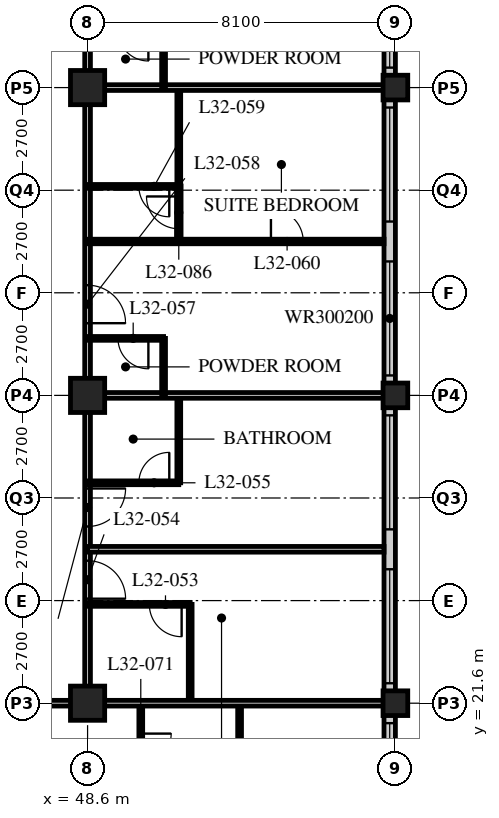
"""IFC4 building model, lengths in metres.
Left out: names, types, materials, properties, quantities, classifications, styles, units other than length and angle.
Written with IfcOpenShell. Run it as: python <this file> out.ifc"""

import sys

from ifc_helpers import new_model, si_unit, direction, frame, frame_2d, origin, origin_2d, place, context, subcontext, project, spatial, rectangle, hollow_rectangle, extrude, element, fill, save


model = new_model("IFC4")
c1 = context("Model", 3, precision=1e-05, world=origin(), true_north=direction((0.0, 1.0)))
c2 = subcontext(c1, "Body", "Model", "MODEL_VIEW")
j1 = project(units=[si_unit("LENGTHUNIT", "METRE"), si_unit("PLANEANGLEUNIT", "RADIAN")], contexts=[c1])
p1 = place(None, origin())
s1 = spatial("IfcSite", under=j1, at=p1, CompositionType="ELEMENT")
p2 = place(p1, origin())
s2 = spatial("IfcBuilding", under=s1, at=p2, CompositionType="ELEMENT")
p3 = place(p2, frame((0.0, 0.0, 127.2)))
s3 = spatial("IfcBuildingStorey", under=s2, at=p3, CompositionType="ELEMENT", Elevation=127.2)
for number, where, z_axis, x_axis in (
    (1, (48.6, 21.6, 0.0), (0.0, 0.0, 1.0), (1.0, 0.0, 0.0)),
    (2, (48.6, 29.7, 0.0), (0.0, 0.0, 1.0), (1.0, 0.0, 0.0)),
    (3, (48.6, 37.8, 0.0), (0.0, 0.0, 1.0), (1.0, 0.0, 0.0)),
):
    element("IfcColumn", number, at=place(p3, frame(where, z_axis=z_axis, x_axis=x_axis)), inside=s3, PredefinedType="COLUMN", context=c2, shape_type="SweptSolid", body=[
        extrude(hollow_rectangle(XDim=0.9, YDim=0.9, WallThickness=0.09, at=origin_2d()), origin(), (0.0, 0.0, 1.0), 3.4),
    ])
for number, where, z_axis, x_axis in (
    (4, (56.7, 21.6, 0.0), (0.0, 0.0, 1.0), (1.0, 0.0, 0.0)),
    (5, (56.7, 29.7, 0.0), (0.0, 0.0, 1.0), (1.0, 0.0, 0.0)),
    (6, (56.7, 37.8, 0.0), (0.0, 0.0, 1.0), (1.0, 0.0, 0.0)),
):
    element("IfcColumn", number, at=place(p3, frame(where, z_axis=z_axis, x_axis=x_axis)), inside=s3, PredefinedType="COLUMN", context=c2, shape_type="SweptSolid", body=[
        extrude(hollow_rectangle(XDim=0.65, YDim=0.65, WallThickness=0.055, at=origin_2d()), origin(), (0.0, 0.0, 1.0), 3.4),
    ])
p4 = place(p3, frame((56.55, 13.8, 0.0), z_axis=(0.0, 0.0, 1.0), x_axis=(0.0, 1.0, 0.0)))
e7 = element("IfcWall", 7, at=p4, inside=s3, PredefinedType="SOLIDWALL", context=c2, shape_type="SweptSolid", body=[
    extrude(rectangle(XDim=32.1, YDim=0.3, at=frame_2d((16.05, 0.0))), origin(), (0.0, 0.0, 1.0), 3.19),
])
p5 = place(p4, frame((0.225, 0.0, 0.9)))
e8 = element("IfcOpeningElement", 8, at=p5, cuts=e7, PredefinedType="OPENING", context=c2, shape_type="SweptSolid", body=[
    extrude(rectangle(XDim=3.0, YDim=2.0, at=frame_2d((1.5, 1.0))), frame((0.0, 0.16, 0.0), z_axis=(0.0, -1.0, 0.0), x_axis=(1.0, 0.0, 0.0)), (0.0, 0.0, 1.0), 0.32),
])
p6 = place(p4, frame((4.275, 0.0, 0.9)))
e9 = element("IfcOpeningElement", 9, at=p6, cuts=e7, PredefinedType="OPENING", context=c2, shape_type="SweptSolid", body=[
    extrude(rectangle(XDim=3.0, YDim=2.0, at=frame_2d((1.5, 1.0))), frame((0.0, 0.16, 0.0), z_axis=(0.0, -1.0, 0.0), x_axis=(1.0, 0.0, 0.0)), (0.0, 0.0, 1.0), 0.32),
])
p7 = place(p4, frame((8.325, 0.0, 0.9)))
e10 = element("IfcOpeningElement", 10, at=p7, cuts=e7, PredefinedType="OPENING", context=c2, shape_type="SweptSolid", body=[
    extrude(rectangle(XDim=3.0, YDim=2.0, at=frame_2d((1.5, 1.0))), frame((0.0, 0.16, 0.0), z_axis=(0.0, -1.0, 0.0), x_axis=(1.0, 0.0, 0.0)), (0.0, 0.0, 1.0), 0.32),
])
p8 = place(p4, frame((12.375, 0.0, 0.9)))
e11 = element("IfcOpeningElement", 11, at=p8, cuts=e7, PredefinedType="OPENING", context=c2, shape_type="SweptSolid", body=[
    extrude(rectangle(XDim=3.0, YDim=2.0, at=frame_2d((1.5, 1.0))), frame((0.0, 0.16, 0.0), z_axis=(0.0, -1.0, 0.0), x_axis=(1.0, 0.0, 0.0)), (0.0, 0.0, 1.0), 0.32),
])
p9 = place(p4, frame((16.425, 0.0, 0.9)))
e12 = element("IfcOpeningElement", 12, at=p9, cuts=e7, PredefinedType="OPENING", context=c2, shape_type="SweptSolid", body=[
    extrude(rectangle(XDim=3.0, YDim=2.0, at=frame_2d((1.5, 1.0))), frame((0.0, 0.16, 0.0), z_axis=(0.0, -1.0, 0.0), x_axis=(1.0, 0.0, 0.0)), (0.0, 0.0, 1.0), 0.32),
])
p10 = place(p4, frame((20.475, 0.0, 0.9)))
e13 = element("IfcOpeningElement", 13, at=p10, cuts=e7, PredefinedType="OPENING", context=c2, shape_type="SweptSolid", body=[
    extrude(rectangle(XDim=3.0, YDim=2.0, at=frame_2d((1.5, 1.0))), frame((0.0, 0.16, 0.0), z_axis=(0.0, -1.0, 0.0), x_axis=(1.0, 0.0, 0.0)), (0.0, 0.0, 1.0), 0.32),
])
p11 = place(p4, frame((24.525, 0.0, 0.9)))
e14 = element("IfcOpeningElement", 14, at=p11, cuts=e7, PredefinedType="OPENING", context=c2, shape_type="SweptSolid", body=[
    extrude(rectangle(XDim=3.0, YDim=2.0, at=frame_2d((1.5, 1.0))), frame((0.0, 0.16, 0.0), z_axis=(0.0, -1.0, 0.0), x_axis=(1.0, 0.0, 0.0)), (0.0, 0.0, 1.0), 0.32),
])
p12 = place(p4, frame((28.575, 0.0, 0.9)))
e15 = element("IfcOpeningElement", 15, at=p12, cuts=e7, PredefinedType="OPENING", context=c2, shape_type="SweptSolid", body=[
    extrude(rectangle(XDim=3.0, YDim=2.0, at=frame_2d((1.5, 1.0))), frame((0.0, 0.16, 0.0), z_axis=(0.0, -1.0, 0.0), x_axis=(1.0, 0.0, 0.0)), (0.0, 0.0, 1.0), 0.32),
])
p13 = place(p3, frame((8.1, 21.6, 0.0), z_axis=(0.0, 0.0, 1.0), x_axis=(1.0, 0.0, 0.0)))
e16 = element("IfcWall", 16, at=p13, inside=s3, PredefinedType="PARTITIONING", context=c2, shape_type="SweptSolid", body=[
    extrude(rectangle(XDim=40.5, YDim=0.15, at=frame_2d((20.25, 0.0))), origin(), (0.0, 0.0, 1.0), 2.578),
])
p14 = place(p13, frame((9.625, 0.0, 0.0)))
e17 = element("IfcOpeningElement", 17, at=p14, cuts=e16, PredefinedType="OPENING", context=c2, shape_type="SweptSolid", body=[
    extrude(rectangle(XDim=1.0, YDim=2.1, at=frame_2d((0.5, 1.05))), frame((0.0, 0.085, 0.0), z_axis=(0.0, -1.0, 0.0), x_axis=(1.0, 0.0, 0.0)), (0.0, 0.0, 1.0), 0.17),
])
p15 = place(p13, frame((21.775, 0.0, 0.0)))
e18 = element("IfcOpeningElement", 18, at=p15, cuts=e16, PredefinedType="OPENING", context=c2, shape_type="SweptSolid", body=[
    extrude(rectangle(XDim=1.0, YDim=2.1, at=frame_2d((0.5, 1.05))), frame((0.0, 0.085, 0.0), z_axis=(0.0, -1.0, 0.0), x_axis=(1.0, 0.0, 0.0)), (0.0, 0.0, 1.0), 0.17),
])
p16 = place(p13, frame((28.95, 0.0, 0.0)))
e19 = element("IfcOpeningElement", 19, at=p16, cuts=e16, PredefinedType="OPENING", context=c2, shape_type="SweptSolid", body=[
    extrude(rectangle(XDim=1.0, YDim=2.1, at=frame_2d((0.5, 1.05))), frame((0.0, 0.085, 0.0), z_axis=(0.0, -1.0, 0.0), x_axis=(1.0, 0.0, 0.0)), (0.0, 0.0, 1.0), 0.17),
])
p17 = place(p13, frame((34.85, 0.0, 0.0)))
e20 = element("IfcOpeningElement", 20, at=p17, cuts=e16, PredefinedType="OPENING", context=c2, shape_type="SweptSolid", body=[
    extrude(rectangle(XDim=1.0, YDim=2.1, at=frame_2d((0.5, 1.05))), frame((0.0, 0.085, 0.0), z_axis=(0.0, -1.0, 0.0), x_axis=(1.0, 0.0, 0.0)), (0.0, 0.0, 1.0), 0.17),
])
p18 = place(p13, frame((1.525, 0.0, 0.0)))
e21 = element("IfcOpeningElement", 21, at=p18, cuts=e16, PredefinedType="OPENING", context=c2, shape_type="SweptSolid", body=[
    extrude(rectangle(XDim=1.0, YDim=2.1, at=frame_2d((0.5, 1.05))), frame((0.0, 0.085, 0.0), z_axis=(0.0, -1.0, 0.0), x_axis=(1.0, 0.0, 0.0)), (0.0, 0.0, 1.0), 0.17),
])
p19 = place(p13, frame((37.975, 0.0, 0.0)))
e22 = element("IfcOpeningElement", 22, at=p19, cuts=e16, PredefinedType="OPENING", context=c2, shape_type="SweptSolid", body=[
    extrude(rectangle(XDim=1.0, YDim=2.1, at=frame_2d((0.5, 1.05))), frame((0.0, 0.085, 0.0), z_axis=(0.0, -1.0, 0.0), x_axis=(1.0, 0.0, 0.0)), (0.0, 0.0, 1.0), 0.17),
])
p20 = place(p3, frame((48.6, 21.6, 0.0), z_axis=(0.0, 0.0, 1.0), x_axis=(0.0, 1.0, 0.0)))
e23 = element("IfcWall", 23, at=p20, inside=s3, PredefinedType="PARTITIONING", context=c2, shape_type="SweptSolid", body=[
    extrude(rectangle(XDim=24.3, YDim=0.15, at=frame_2d((12.15, 0.0))), origin(), (0.0, 0.0, 1.0), 2.578),
])
p21 = place(p20, frame((2.75, 0.0, 0.0)))
e24 = element("IfcOpeningElement", 24, at=p21, cuts=e23, PredefinedType="OPENING", context=c2, shape_type="SweptSolid", body=[
    extrude(rectangle(XDim=1.0, YDim=2.1, at=frame_2d((0.5, 1.05))), frame((0.0, 0.085, 0.0), z_axis=(0.0, -1.0, 0.0), x_axis=(1.0, 0.0, 0.0)), (0.0, 0.0, 1.0), 0.17),
])
p22 = place(p20, frame((4.65, 0.0, 0.0)))
e25 = element("IfcOpeningElement", 25, at=p22, cuts=e23, PredefinedType="OPENING", context=c2, shape_type="SweptSolid", body=[
    extrude(rectangle(XDim=1.0, YDim=2.1, at=frame_2d((0.5, 1.05))), frame((0.0, 0.085, 0.0), z_axis=(0.0, -1.0, 0.0), x_axis=(1.0, 0.0, 0.0)), (0.0, 0.0, 1.0), 0.17),
])
p23 = place(p20, frame((10.0, 0.0, 0.0)))
e26 = element("IfcOpeningElement", 26, at=p23, cuts=e23, PredefinedType="OPENING", context=c2, shape_type="SweptSolid", body=[
    extrude(rectangle(XDim=1.0, YDim=2.1, at=frame_2d((0.5, 1.05))), frame((0.0, 0.085, 0.0), z_axis=(0.0, -1.0, 0.0), x_axis=(1.0, 0.0, 0.0)), (0.0, 0.0, 1.0), 0.17),
])
p24 = place(p20, frame((18.1, 0.0, 0.0)))
e27 = element("IfcOpeningElement", 27, at=p24, cuts=e23, PredefinedType="OPENING", context=c2, shape_type="SweptSolid", body=[
    extrude(rectangle(XDim=1.0, YDim=2.1, at=frame_2d((0.5, 1.05))), frame((0.0, 0.085, 0.0), z_axis=(0.0, -1.0, 0.0), x_axis=(1.0, 0.0, 0.0)), (0.0, 0.0, 1.0), 0.17),
])
p25 = place(p3, frame((51.3, 21.6, 0.0), z_axis=(0.0, 0.0, 1.0), x_axis=(0.0, 1.0, 0.0)))
e28 = element("IfcWall", 28, at=p25, inside=s3, PredefinedType="PARTITIONING", context=c2, shape_type="SweptSolid", body=[
    extrude(rectangle(XDim=2.6, YDim=0.1, at=frame_2d((1.3, 0.0))), origin(), (0.0, 0.0, 1.0), 3.19),
])
p26 = place(p3, frame((48.6, 24.2, 0.0), z_axis=(0.0, 0.0, 1.0), x_axis=(1.0, 0.0, 0.0)))
e29 = element("IfcWall", 29, at=p26, inside=s3, PredefinedType="PARTITIONING", context=c2, shape_type="SweptSolid", body=[
    extrude(rectangle(XDim=2.7, YDim=0.1, at=frame_2d((1.35, 0.0))), origin(), (0.0, 0.0, 1.0), 3.19),
])
p27 = place(p26, frame((1.625, 0.0, 0.0)))
e30 = element("IfcOpeningElement", 30, at=p27, cuts=e29, PredefinedType="OPENING", context=c2, shape_type="SweptSolid", body=[
    extrude(rectangle(XDim=0.85, YDim=2.1, at=frame_2d((0.425, 1.05))), frame((0.0, 0.06, 0.0), z_axis=(0.0, -1.0, 0.0), x_axis=(1.0, 0.0, 0.0)), (0.0, 0.0, 1.0), 0.12),
])
p28 = place(p3, frame((48.6, 25.65, 0.0), z_axis=(0.0, 0.0, 1.0), x_axis=(1.0, 0.0, 0.0)))
e31 = element("IfcWall", 31, at=p28, inside=s3, PredefinedType="PARTITIONING", context=c2, shape_type="SweptSolid", body=[
    extrude(rectangle(XDim=7.8, YDim=0.15, at=frame_2d((3.9, 0.0))), origin(), (0.0, 0.0, 1.0), 3.19),
])
p29 = place(p3, frame((51.0, 27.4, 0.0), z_axis=(0.0, 0.0, 1.0), x_axis=(0.0, 1.0, 0.0)))
e32 = element("IfcWall", 32, at=p29, inside=s3, PredefinedType="PARTITIONING", context=c2, shape_type="SweptSolid", body=[
    extrude(rectangle(XDim=2.3, YDim=0.1, at=frame_2d((1.15, 0.0))), origin(), (0.0, 0.0, 1.0), 3.19),
])
p30 = place(p3, frame((48.6, 27.4, 0.0), z_axis=(0.0, 0.0, 1.0), x_axis=(1.0, 0.0, 0.0)))
e33 = element("IfcWall", 33, at=p30, inside=s3, PredefinedType="PARTITIONING", context=c2, shape_type="SweptSolid", body=[
    extrude(rectangle(XDim=2.4, YDim=0.1, at=frame_2d((1.2, 0.0))), origin(), (0.0, 0.0, 1.0), 3.19),
])
p31 = place(p30, frame((1.35, 0.0, 0.0)))
e34 = element("IfcOpeningElement", 34, at=p31, cuts=e33, PredefinedType="OPENING", context=c2, shape_type="SweptSolid", body=[
    extrude(rectangle(XDim=0.8, YDim=2.1, at=frame_2d((0.4, 1.05))), frame((0.0, 0.06, 0.0), z_axis=(0.0, -1.0, 0.0), x_axis=(1.0, 0.0, 0.0)), (0.0, 0.0, 1.0), 0.12),
])
p32 = place(p3, frame((48.6, 29.7, 0.0), z_axis=(0.0, 0.0, 1.0), x_axis=(1.0, 0.0, 0.0)))
e35 = element("IfcWall", 35, at=p32, inside=s3, PredefinedType="PARTITIONING", context=c2, shape_type="SweptSolid", body=[
    extrude(rectangle(XDim=7.8, YDim=0.15, at=frame_2d((3.9, 0.0))), origin(), (0.0, 0.0, 1.0), 2.578),
])
p33 = place(p3, frame((50.6, 29.7, 0.0), z_axis=(0.0, 0.0, 1.0), x_axis=(0.0, 1.0, 0.0)))
e36 = element("IfcWall", 36, at=p33, inside=s3, PredefinedType="PARTITIONING", context=c2, shape_type="SweptSolid", body=[
    extrude(rectangle(XDim=1.5, YDim=0.1, at=frame_2d((0.75, 0.0))), origin(), (0.0, 0.0, 1.0), 3.19),
])
p34 = place(p3, frame((48.6, 31.2, 0.0), z_axis=(0.0, 0.0, 1.0), x_axis=(1.0, 0.0, 0.0)))
e37 = element("IfcWall", 37, at=p34, inside=s3, PredefinedType="PARTITIONING", context=c2, shape_type="SweptSolid", body=[
    extrude(rectangle(XDim=2.0, YDim=0.1, at=frame_2d((1.0, 0.0))), origin(), (0.0, 0.0, 1.0), 3.19),
])
p35 = place(p34, frame((0.8, 0.0, 0.0)))
e38 = element("IfcOpeningElement", 38, at=p35, cuts=e37, PredefinedType="OPENING", context=c2, shape_type="SweptSolid", body=[
    extrude(rectangle(XDim=0.8, YDim=2.1, at=frame_2d((0.4, 1.05))), frame((0.0, 0.06, 0.0), z_axis=(0.0, -1.0, 0.0), x_axis=(1.0, 0.0, 0.0)), (0.0, 0.0, 1.0), 0.12),
])
p36 = place(p3, frame((51.0, 35.2, 0.0), z_axis=(0.0, 0.0, 1.0), x_axis=(0.0, 1.0, 0.0)))
e39 = element("IfcWall", 39, at=p36, inside=s3, PredefinedType="PARTITIONING", context=c2, shape_type="SweptSolid", body=[
    extrude(rectangle(XDim=2.6, YDim=0.1, at=frame_2d((1.3, 0.0))), origin(), (0.0, 0.0, 1.0), 3.19),
])
p37 = place(p3, frame((48.6, 35.2, 0.0), z_axis=(0.0, 0.0, 1.0), x_axis=(1.0, 0.0, 0.0)))
e40 = element("IfcWall", 40, at=p37, inside=s3, PredefinedType="PARTITIONING", context=c2, shape_type="SweptSolid", body=[
    extrude(rectangle(XDim=2.4, YDim=0.1, at=frame_2d((1.2, 0.0))), origin(), (0.0, 0.0, 1.0), 3.19),
])
p38 = place(p37, frame((1.35, 0.0, 0.0)))
e41 = element("IfcOpeningElement", 41, at=p38, cuts=e40, PredefinedType="OPENING", context=c2, shape_type="SweptSolid", body=[
    extrude(rectangle(XDim=0.8, YDim=2.1, at=frame_2d((0.4, 1.05))), frame((0.0, 0.06, 0.0), z_axis=(0.0, -1.0, 0.0), x_axis=(1.0, 0.0, 0.0)), (0.0, 0.0, 1.0), 0.12),
])
p39 = place(p3, frame((48.6, 33.75, 0.0), z_axis=(0.0, 0.0, 1.0), x_axis=(1.0, 0.0, 0.0)))
e42 = element("IfcWall", 42, at=p39, inside=s3, PredefinedType="PARTITIONING", context=c2, shape_type="SweptSolid", body=[
    extrude(rectangle(XDim=7.8, YDim=0.12, at=frame_2d((3.9, 0.0))), origin(), (0.0, 0.0, 1.0), 3.19),
])
p40 = place(p39, frame((4.825, 0.0, 0.0)))
e43 = element("IfcOpeningElement", 43, at=p40, cuts=e42, PredefinedType="OPENING", context=c2, shape_type="SweptSolid", body=[
    extrude(rectangle(XDim=0.85, YDim=2.1, at=frame_2d((0.425, 1.05))), frame((0.0, 0.07, 0.0), z_axis=(0.0, -1.0, 0.0), x_axis=(1.0, 0.0, 0.0)), (0.0, 0.0, 1.0), 0.14),
])
p41 = place(p3, frame((48.6, 37.8, 0.0), z_axis=(0.0, 0.0, 1.0), x_axis=(1.0, 0.0, 0.0)))
e44 = element("IfcWall", 44, at=p41, inside=s3, PredefinedType="PARTITIONING", context=c2, shape_type="SweptSolid", body=[
    extrude(rectangle(XDim=7.8, YDim=0.15, at=frame_2d((3.9, 0.0))), origin(), (0.0, 0.0, 1.0), 2.578),
])
p42 = place(p3, frame((50.6, 37.8, 0.0), z_axis=(0.0, 0.0, 1.0), x_axis=(0.0, 1.0, 0.0)))
e45 = element("IfcWall", 45, at=p42, inside=s3, PredefinedType="PARTITIONING", context=c2, shape_type="SweptSolid", body=[
    extrude(rectangle(XDim=1.5, YDim=0.1, at=frame_2d((0.75, 0.0))), origin(), (0.0, 0.0, 1.0), 3.19),
])
p43 = place(p3, frame((50.0, 21.6, 0.0), z_axis=(0.0, 0.0, 1.0), x_axis=(0.0, -1.0, 0.0)))
e46 = element("IfcWall", 46, at=p43, inside=s3, PredefinedType="PARTITIONING", context=c2, shape_type="SweptSolid", body=[
    extrude(rectangle(XDim=2.4, YDim=0.1, at=frame_2d((1.2, 0.0))), origin(), (0.0, 0.0, 1.0), 3.19),
])
p44 = place(p43, frame((0.8, 0.0, 0.0)))
e47 = element("IfcOpeningElement", 47, at=p44, cuts=e46, PredefinedType="OPENING", context=c2, shape_type="SweptSolid", body=[
    extrude(rectangle(XDim=0.8, YDim=2.1, at=frame_2d((0.4, 1.05))), frame((0.0, 0.06, 0.0), z_axis=(0.0, -1.0, 0.0), x_axis=(1.0, 0.0, 0.0)), (0.0, 0.0, 1.0), 0.12),
])
p45 = place(p3, frame((52.6, 21.6, 0.0), z_axis=(0.0, 0.0, 1.0), x_axis=(0.0, -1.0, 0.0)))
e48 = element("IfcWall", 48, at=p45, inside=s3, PredefinedType="PARTITIONING", context=c2, shape_type="SweptSolid", body=[
    extrude(rectangle(XDim=2.4, YDim=0.1, at=frame_2d((1.2, 0.0))), origin(), (0.0, 0.0, 1.0), 3.19),
])
p46 = place(p3, frame((48.6, 21.6, 0.0), z_axis=(0.0, 0.0, 1.0), x_axis=(1.0, 0.0, 0.0)))
e49 = element("IfcWall", 49, at=p46, inside=s3, PredefinedType="PARTITIONING", context=c2, shape_type="SweptSolid", body=[
    extrude(rectangle(XDim=7.8, YDim=0.15, at=frame_2d((3.9, 0.0))), origin(), (0.0, 0.0, 1.0), 2.578),
])
p47 = place(p3, frame((51.0, 35.21, 0.0), z_axis=(0.0, 0.0, 1.0), x_axis=(0.0, -1.0, 0.0)))
e50 = element("IfcWall", 50, at=p47, inside=s3, PredefinedType="PARTITIONING", context=c2, shape_type="SweptSolid", body=[
    extrude(rectangle(XDim=1.46, YDim=0.12, at=frame_2d((0.73, 0.0))), origin(), (0.0, 0.0, 1.0), 3.19),
])
p48 = place(p47, frame((0.275, 0.0, 0.0)))
e51 = element("IfcOpeningElement", 51, at=p48, cuts=e50, PredefinedType="OPENING", context=c2, shape_type="SweptSolid", body=[
    extrude(rectangle(XDim=0.85, YDim=2.1, at=frame_2d((0.425, 1.05))), frame((0.0, 0.07, 0.0), z_axis=(0.0, -1.0, 0.0), x_axis=(1.0, 0.0, 0.0)), (0.0, 0.0, 1.0), 0.14),
])
p49 = place(p6, origin())
e52 = element("IfcWindow", 52, at=p49, inside=s3, PartitioningType="SINGLE_PANEL", PredefinedType="WINDOW", context=c2, shape_type="SweptSolid", body=[
    extrude(rectangle(XDim=3.0, YDim=2.0, at=frame_2d((1.5, 1.0))), frame((0.0, 0.03, 0.0), z_axis=(0.0, -1.0, 0.0), x_axis=(1.0, 0.0, 0.0)), (0.0, 0.0, 1.0), 0.06),
])
fill(e9, e52)
p50 = place(p7, origin())
e53 = element("IfcWindow", 53, at=p50, inside=s3, PartitioningType="SINGLE_PANEL", PredefinedType="WINDOW", context=c2, shape_type="SweptSolid", body=[
    extrude(rectangle(XDim=3.0, YDim=2.0, at=frame_2d((1.5, 1.0))), frame((0.0, 0.03, 0.0), z_axis=(0.0, -1.0, 0.0), x_axis=(1.0, 0.0, 0.0)), (0.0, 0.0, 1.0), 0.06),
])
fill(e10, e53)
p51 = place(p8, origin())
e54 = element("IfcWindow", 54, at=p51, inside=s3, PartitioningType="SINGLE_PANEL", PredefinedType="WINDOW", context=c2, shape_type="SweptSolid", body=[
    extrude(rectangle(XDim=3.0, YDim=2.0, at=frame_2d((1.5, 1.0))), frame((0.0, 0.03, 0.0), z_axis=(0.0, -1.0, 0.0), x_axis=(1.0, 0.0, 0.0)), (0.0, 0.0, 1.0), 0.06),
])
fill(e11, e54)
p52 = place(p9, origin())
e55 = element("IfcWindow", 55, at=p52, inside=s3, PartitioningType="SINGLE_PANEL", PredefinedType="WINDOW", context=c2, shape_type="SweptSolid", body=[
    extrude(rectangle(XDim=3.0, YDim=2.0, at=frame_2d((1.5, 1.0))), frame((0.0, 0.03, 0.0), z_axis=(0.0, -1.0, 0.0), x_axis=(1.0, 0.0, 0.0)), (0.0, 0.0, 1.0), 0.06),
])
fill(e12, e55)
p53 = place(p10, origin())
e56 = element("IfcWindow", 56, at=p53, inside=s3, PartitioningType="SINGLE_PANEL", PredefinedType="WINDOW", context=c2, shape_type="SweptSolid", body=[
    extrude(rectangle(XDim=3.0, YDim=2.0, at=frame_2d((1.5, 1.0))), frame((0.0, 0.03, 0.0), z_axis=(0.0, -1.0, 0.0), x_axis=(1.0, 0.0, 0.0)), (0.0, 0.0, 1.0), 0.06),
])
fill(e13, e56)
p54 = place(p11, origin())
e57 = element("IfcWindow", 57, at=p54, inside=s3, PartitioningType="SINGLE_PANEL", PredefinedType="WINDOW", context=c2, shape_type="SweptSolid", body=[
    extrude(rectangle(XDim=3.0, YDim=2.0, at=frame_2d((1.5, 1.0))), frame((0.0, 0.03, 0.0), z_axis=(0.0, -1.0, 0.0), x_axis=(1.0, 0.0, 0.0)), (0.0, 0.0, 1.0), 0.06),
])
fill(e14, e57)
p55 = place(p27, origin())
e58 = element("IfcDoor", 58, at=p55, inside=s3, OperationType="SINGLE_SWING_LEFT", PredefinedType="DOOR", context=c2, shape_type="SweptSolid", body=[
    extrude(rectangle(XDim=0.85, YDim=2.1, at=frame_2d((0.425, 1.05))), frame((0.0, 0.025, 0.0), z_axis=(0.0, -1.0, 0.0), x_axis=(1.0, 0.0, 0.0)), (0.0, 0.0, 1.0), 0.05),
])
fill(e30, e58)
p56 = place(p21, origin())
e59 = element("IfcDoor", 59, at=p56, inside=s3, OperationType="SINGLE_SWING_RIGHT", PredefinedType="DOOR", context=c2, shape_type="SweptSolid", body=[
    extrude(rectangle(XDim=1.0, YDim=2.1, at=frame_2d((0.5, 1.05))), frame((0.0, 0.025, 0.0), z_axis=(0.0, -1.0, 0.0), x_axis=(1.0, 0.0, 0.0)), (0.0, 0.0, 1.0), 0.05),
])
fill(e24, e59)
p57 = place(p31, origin())
e60 = element("IfcDoor", 60, at=p57, inside=s3, OperationType="SINGLE_SWING_RIGHT", PredefinedType="DOOR", context=c2, shape_type="SweptSolid", body=[
    extrude(rectangle(XDim=0.8, YDim=2.1, at=frame_2d((0.4, 1.05))), frame((0.0, 0.025, 0.0), z_axis=(0.0, -1.0, 0.0), x_axis=(1.0, 0.0, 0.0)), (0.0, 0.0, 1.0), 0.05),
])
fill(e34, e60)
p58 = place(p22, origin())
e61 = element("IfcDoor", 61, at=p58, inside=s3, OperationType="SINGLE_SWING_LEFT", PredefinedType="DOOR", context=c2, shape_type="SweptSolid", body=[
    extrude(rectangle(XDim=1.0, YDim=2.1, at=frame_2d((0.5, 1.05))), frame((0.0, 0.025, 0.0), z_axis=(0.0, -1.0, 0.0), x_axis=(1.0, 0.0, 0.0)), (0.0, 0.0, 1.0), 0.05),
])
fill(e25, e61)
p59 = place(p35, origin())
e62 = element("IfcDoor", 62, at=p59, inside=s3, OperationType="SINGLE_SWING_LEFT", PredefinedType="DOOR", context=c2, shape_type="SweptSolid", body=[
    extrude(rectangle(XDim=0.8, YDim=2.1, at=frame_2d((0.4, 1.05))), frame((0.0, 0.025, 0.0), z_axis=(0.0, -1.0, 0.0), x_axis=(1.0, 0.0, 0.0)), (0.0, 0.0, 1.0), 0.05),
])
fill(e38, e62)
p60 = place(p23, origin())
e63 = element("IfcDoor", 63, at=p60, inside=s3, OperationType="SINGLE_SWING_RIGHT", PredefinedType="DOOR", context=c2, shape_type="SweptSolid", body=[
    extrude(rectangle(XDim=1.0, YDim=2.1, at=frame_2d((0.5, 1.05))), frame((0.0, 0.025, 0.0), z_axis=(0.0, -1.0, 0.0), x_axis=(1.0, 0.0, 0.0)), (0.0, 0.0, 1.0), 0.05),
])
fill(e26, e63)
p61 = place(p38, origin())
e64 = element("IfcDoor", 64, at=p61, inside=s3, OperationType="SINGLE_SWING_LEFT", PredefinedType="DOOR", context=c2, shape_type="SweptSolid", body=[
    extrude(rectangle(XDim=0.8, YDim=2.1, at=frame_2d((0.4, 1.05))), frame((0.0, 0.025, 0.0), z_axis=(0.0, -1.0, 0.0), x_axis=(1.0, 0.0, 0.0)), (0.0, 0.0, 1.0), 0.05),
])
fill(e41, e64)
p62 = place(p40, origin())
e65 = element("IfcDoor", 65, at=p62, inside=s3, OperationType="SINGLE_SWING_LEFT", PredefinedType="DOOR", context=c2, shape_type="SweptSolid", body=[
    extrude(rectangle(XDim=0.85, YDim=2.1, at=frame_2d((0.425, 1.05))), frame((0.0, 0.025, 0.0), z_axis=(0.0, -1.0, 0.0), x_axis=(1.0, 0.0, 0.0)), (0.0, 0.0, 1.0), 0.05),
])
fill(e43, e65)
p63 = place(p44, origin())
e66 = element("IfcDoor", 66, at=p63, inside=s3, OperationType="SINGLE_SWING_LEFT", PredefinedType="DOOR", context=c2, shape_type="SweptSolid", body=[
    extrude(rectangle(XDim=0.8, YDim=2.1, at=frame_2d((0.4, 1.05))), frame((0.0, 0.025, 0.0), z_axis=(0.0, -1.0, 0.0), x_axis=(1.0, 0.0, 0.0)), (0.0, 0.0, 1.0), 0.05),
])
fill(e47, e66)
p64 = place(p48, origin())
e67 = element("IfcDoor", 67, at=p64, inside=s3, OperationType="SINGLE_SWING_RIGHT", PredefinedType="DOOR", context=c2, shape_type="SweptSolid", body=[
    extrude(rectangle(XDim=0.85, YDim=2.1, at=frame_2d((0.425, 1.05))), frame((0.0, 0.025, 0.0), z_axis=(0.0, -1.0, 0.0), x_axis=(1.0, 0.0, 0.0)), (0.0, 0.0, 1.0), 0.05),
])
fill(e51, e67)
save(model, sys.argv[1])
